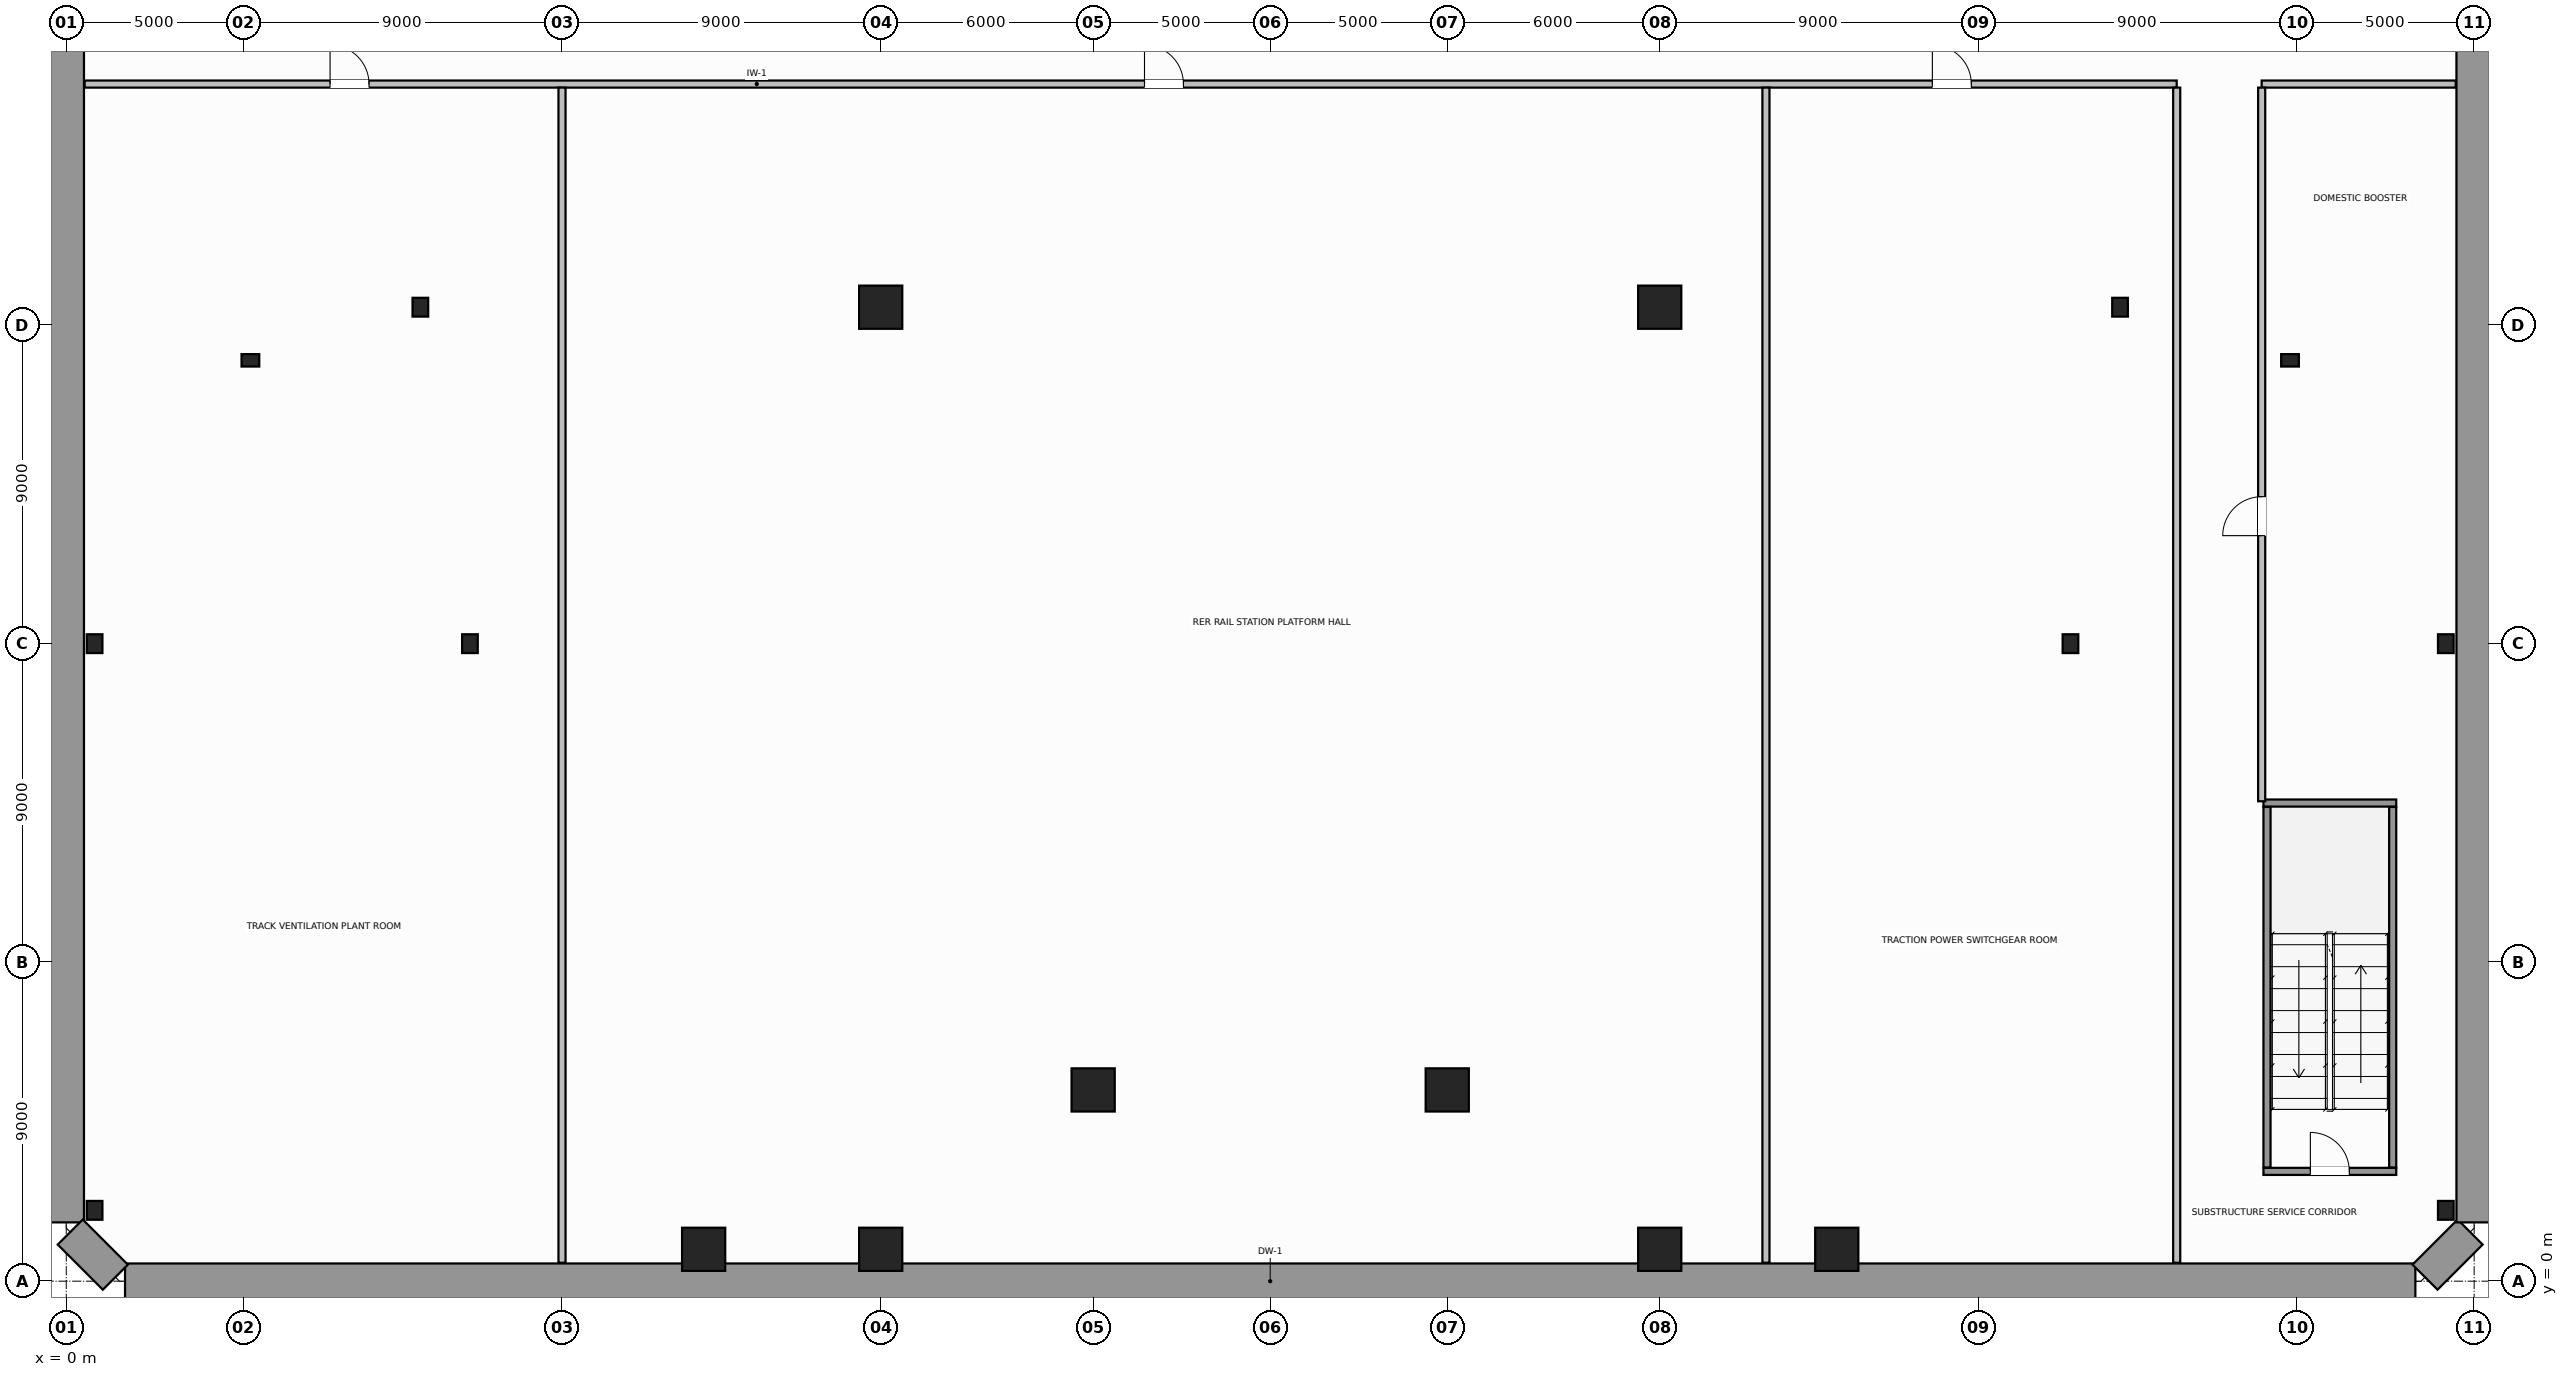
"""IFC4 building model, lengths in metres.
Left out: names, types, materials, properties, quantities, classifications, styles, units other than length and angle.
Written with IfcOpenShell. Run it as: python <this file> out.ifc"""

import sys

from ifc_helpers import new_model, si_unit, direction, frame, frame_2d, origin, origin_2d, place, context, subcontext, project, spatial, rectangle, hollow_circle, i_section, extrude, source, transform, mapped, element, fill, save


model = new_model("IFC4")
c1 = context("Model", 3, precision=1e-05, world=origin(), true_north=direction((0.0, 1.0)))
c2 = subcontext(c1, "Body", "Model", "MODEL_VIEW")
j1 = project(units=[si_unit("LENGTHUNIT", "METRE"), si_unit("PLANEANGLEUNIT", "RADIAN")], contexts=[c1])
p1 = place(None, origin())
s1 = spatial("IfcSite", under=j1, at=p1, CompositionType="ELEMENT")
p2 = place(p1, origin())
s2 = spatial("IfcBuilding", under=s1, at=p2, CompositionType="ELEMENT")
p3 = place(p2, frame((0.0, 0.0, -10.4)))
s3 = spatial("IfcBuildingStorey", under=s2, at=p3, CompositionType="ELEMENT", Elevation=-10.4)
m1 = source(origin(), c2, "Body", "SweptSolid", [
    extrude(hollow_circle(Radius=0.61, WallThickness=0.05, at=origin_2d()), origin(), (0.0, 0.0, 1.0), 5.2),
])
for number, where, z_axis, x_axis in (
    (1, (18.0, 0.9, 0.0), (0.0, 0.0, 1.0), (1.0, 0.0, 0.0)),
    (2, (23.0, 0.9, 0.0), (0.0, 0.0, 1.0), (1.0, 0.0, 0.0)),
    (3, (29.0, 5.4, 0.0), (0.0, 0.0, 1.0), (1.0, 0.0, 0.0)),
    (4, (39.0, 5.4, 0.0), (0.0, 0.0, 1.0), (1.0, 0.0, 0.0)),
    (5, (45.0, 0.9, 0.0), (0.0, 0.0, 1.0), (1.0, 0.0, 0.0)),
    (6, (50.0, 0.9, 0.0), (0.0, 0.0, 1.0), (1.0, 0.0, 0.0)),
):
    element("IfcColumn", number, at=place(p3, frame(where, z_axis=z_axis, x_axis=x_axis)), inside=s3, PredefinedType="COLUMN", context=c2, shape_type="MappedRepresentation", body=[
        mapped(m1, transform((0.0, 0.0, 0.0), scale=1.0)),
    ])
m2 = source(origin(), c2, "Body", "SweptSolid", [
    extrude(i_section(OverallWidth=0.442, OverallDepth=0.531, WebThickness=0.065, FlangeThickness=0.076, FilletRadius=0.015, at=origin_2d()), origin(), (0.0, 0.0, 1.0), 5.2),
])
for number, where, z_axis, x_axis in (
    (7, (0.8, 2.0, 0.0), (0.0, 0.0, 1.0), (1.0, 0.0, 0.0)),
    (8, (0.8, 18.0, 0.0), (0.0, 0.0, 1.0), (1.0, 0.0, 0.0)),
    (9, (67.2, 2.0, 0.0), (0.0, 0.0, 1.0), (1.0, 0.0, 0.0)),
    (10, (67.2, 18.0, 0.0), (0.0, 0.0, 1.0), (1.0, 0.0, 0.0)),
    (11, (10.0, 27.5, 0.0), (0.0, 0.0, 1.0), (1.0, 0.0, 0.0)),
    (12, (11.4, 18.0, 0.0), (0.0, 0.0, 1.0), (1.0, 0.0, 0.0)),
    (13, (58.0, 27.5, 0.0), (0.0, 0.0, 1.0), (1.0, 0.0, 0.0)),
    (14, (56.6, 18.0, 0.0), (0.0, 0.0, 1.0), (1.0, 0.0, 0.0)),
):
    element("IfcColumn", number, at=place(p3, frame(where, z_axis=z_axis, x_axis=x_axis)), inside=s3, PredefinedType="COLUMN", context=c2, shape_type="MappedRepresentation", body=[
        mapped(m2, transform((0.0, 0.0, 0.0), scale=1.0)),
    ])
for number, where, z_axis, x_axis in (
    (15, (23.0, 27.5, 0.0), (0.0, 0.0, 1.0), (1.0, 0.0, 0.0)),
    (16, (45.0, 27.5, 0.0), (0.0, 0.0, 1.0), (1.0, 0.0, 0.0)),
):
    element("IfcColumn", number, at=place(p3, frame(where, z_axis=z_axis, x_axis=x_axis)), inside=s3, PredefinedType="COLUMN", context=c2, shape_type="MappedRepresentation", body=[
        mapped(m1, transform((0.0, 0.0, 0.0), scale=1.0)),
    ])
m3 = source(origin(), c2, "Body", "SweptSolid", [
    extrude(rectangle(XDim=0.5, YDim=0.35, at=origin_2d()), origin(), (0.0, 0.0, 1.0), 4.88),
])
for number, where, z_axis, x_axis in (
    (17, (5.2, 26.0, 0.0), (0.0, 0.0, 1.0), (1.0, 0.0, 0.0)),
    (18, (62.8, 26.0, 0.0), (0.0, 0.0, 1.0), (1.0, 0.0, 0.0)),
):
    element("IfcColumn", number, at=place(p3, frame(where, z_axis=z_axis, x_axis=x_axis)), inside=s3, PredefinedType="PILASTER", context=c2, shape_type="MappedRepresentation", body=[
        mapped(m3, transform((0.0, 0.0, 0.0), scale=1.0)),
    ])
p4 = place(p3, frame((1.66, 0.0, 0.0), z_axis=(0.0, 0.0, 1.0), x_axis=(1.0, 0.0, 0.0)))
e19 = element("IfcWall", 19, at=p4, inside=s3, PredefinedType="STANDARD", context=c2, shape_type="SweptSolid", body=[
    extrude(rectangle(XDim=64.68, YDim=1.0, at=frame_2d((32.34, 0.0))), origin(), (0.0, 0.0, 1.0), 5.2),
])
p5 = place(p3, frame((66.613, 0.113, 0.0), z_axis=(0.0, 0.0, 1.0), x_axis=(0.707106781187, 0.707106781187, 0.0)))
e20 = element("IfcWall", 20, at=p5, inside=s3, PredefinedType="STANDARD", context=c2, shape_type="SweptSolid", body=[
    extrude(rectangle(XDim=1.802, YDim=1.0, at=frame_2d((0.901, 0.0))), origin(), (0.0, 0.0, 1.0), 5.2),
])
for number, where, z_axis, x_axis in (
    (21, (68.0, 1.66, 0.0), (0.0, 0.0, 1.0), (0.0, 1.0, 0.0)),
    (22, (0.0, 50.34, 0.0), (0.0, 0.0, 1.0), (0.0, -1.0, 0.0)),
):
    element("IfcWall", number, at=place(p3, frame(where, z_axis=z_axis, x_axis=x_axis)), inside=s3, PredefinedType="STANDARD", context=c2, shape_type="SweptSolid", body=[
        extrude(rectangle(XDim=48.68, YDim=1.0, at=frame_2d((24.34, 0.0))), origin(), (0.0, 0.0, 1.0), 5.2),
    ])
p6 = place(p3, frame((0.113, 1.387, 0.0), z_axis=(0.0, 0.0, 1.0), x_axis=(0.707106781187, -0.707106781187, 0.0)))
e23 = element("IfcWall", 23, at=p6, inside=s3, PredefinedType="STANDARD", context=c2, shape_type="SweptSolid", body=[
    extrude(rectangle(XDim=1.802, YDim=1.0, at=frame_2d((0.901, 0.0))), origin(), (0.0, 0.0, 1.0), 5.2),
])
p7 = place(p3, frame((62.05, 3.1, 0.0), z_axis=(0.0, 0.0, 1.0), x_axis=(1.0, 0.0, 0.0)))
e24 = element("IfcWall", 24, at=p7, inside=s3, PredefinedType="SOLIDWALL", context=c2, shape_type="SweptSolid", body=[
    extrude(rectangle(XDim=3.75, YDim=0.2, at=frame_2d((1.875, 0.0))), origin(), (0.0, 0.0, 1.0), 5.2),
])
p8 = place(p7, frame((1.325, 0.0, 0.0)))
e25 = element("IfcOpeningElement", 25, at=p8, cuts=e24, PredefinedType="OPENING", context=c2, shape_type="SweptSolid", body=[
    extrude(rectangle(XDim=1.1, YDim=2.15, at=frame_2d((0.55, 1.075))), frame((0.0, 0.11, 0.0), z_axis=(0.0, -1.0, 0.0), x_axis=(1.0, 0.0, 0.0)), (0.0, 0.0, 1.0), 0.22),
])
p9 = place(p3, frame((62.05, 13.5, 0.0), z_axis=(0.0, 0.0, 1.0), x_axis=(1.0, 0.0, 0.0)))
e26 = element("IfcWall", 26, at=p9, inside=s3, PredefinedType="SOLIDWALL", context=c2, shape_type="SweptSolid", body=[
    extrude(rectangle(XDim=3.75, YDim=0.2, at=frame_2d((1.875, 0.0))), origin(), (0.0, 0.0, 1.0), 5.2),
])
for number, where, z_axis, x_axis in (
    (27, (62.15, 3.21, 0.0), (0.0, 0.0, 1.0), (0.0, 1.0, 0.0)),
    (28, (65.7, 3.21, 0.0), (0.0, 0.0, 1.0), (0.0, 1.0, 0.0)),
):
    element("IfcWall", number, at=place(p3, frame(where, z_axis=z_axis, x_axis=x_axis)), inside=s3, PredefinedType="SOLIDWALL", context=c2, shape_type="SweptSolid", body=[
        extrude(rectangle(XDim=10.18, YDim=0.2, at=frame_2d((5.09, 0.0))), origin(), (0.0, 0.0, 1.0), 5.2),
    ])
p10 = place(p3, frame((0.52, 33.8, 0.0), z_axis=(0.0, 0.0, 1.0), x_axis=(1.0, 0.0, 0.0)))
e29 = element("IfcWall", 29, at=p10, inside=s3, PredefinedType="SOLIDWALL", context=c2, shape_type="SweptSolid", body=[
    extrude(rectangle(XDim=59.08, YDim=0.2, at=frame_2d((29.54, 0.0))), origin(), (0.0, 0.0, 1.0), 4.88),
])
p11 = place(p10, frame((6.93, 0.0, 0.0)))
e30 = element("IfcOpeningElement", 30, at=p11, cuts=e29, PredefinedType="OPENING", context=c2, shape_type="SweptSolid", body=[
    extrude(rectangle(XDim=1.1, YDim=2.15, at=frame_2d((0.55, 1.075))), frame((0.0, 0.11, 0.0), z_axis=(0.0, -1.0, 0.0), x_axis=(1.0, 0.0, 0.0)), (0.0, 0.0, 1.0), 0.22),
])
p12 = place(p10, frame((29.93, 0.0, 0.0)))
e31 = element("IfcOpeningElement", 31, at=p12, cuts=e29, PredefinedType="OPENING", context=c2, shape_type="SweptSolid", body=[
    extrude(rectangle(XDim=1.1, YDim=2.15, at=frame_2d((0.55, 1.075))), frame((0.0, 0.11, 0.0), z_axis=(0.0, -1.0, 0.0), x_axis=(1.0, 0.0, 0.0)), (0.0, 0.0, 1.0), 0.22),
])
p13 = place(p10, frame((52.18, 0.0, 0.0)))
e32 = element("IfcOpeningElement", 32, at=p13, cuts=e29, PredefinedType="OPENING", context=c2, shape_type="SweptSolid", body=[
    extrude(rectangle(XDim=1.1, YDim=2.15, at=frame_2d((0.55, 1.075))), frame((0.0, 0.11, 0.0), z_axis=(0.0, -1.0, 0.0), x_axis=(1.0, 0.0, 0.0)), (0.0, 0.0, 1.0), 0.22),
])
p14 = place(p3, frame((62.0, 33.8, 0.0), z_axis=(0.0, 0.0, 1.0), x_axis=(1.0, 0.0, 0.0)))
e33 = element("IfcWall", 33, at=p14, inside=s3, PredefinedType="SOLIDWALL", context=c2, shape_type="SweptSolid", body=[
    extrude(rectangle(XDim=5.48, YDim=0.2, at=frame_2d((2.74, 0.0))), origin(), (0.0, 0.0, 1.0), 4.88),
])
p15 = place(p3, frame((59.6, 0.52, 0.0), z_axis=(0.0, 0.0, 1.0), x_axis=(0.0, 1.0, 0.0)))
e34 = element("IfcWall", 34, at=p15, inside=s3, PredefinedType="SOLIDWALL", context=c2, shape_type="SweptSolid", body=[
    extrude(rectangle(XDim=33.18, YDim=0.2, at=frame_2d((16.59, 0.0))), origin(), (0.0, 0.0, 1.0), 3.96),
])
p16 = place(p3, frame((62.0, 13.55, 0.0), z_axis=(0.0, 0.0, 1.0), x_axis=(0.0, 1.0, 0.0)))
e35 = element("IfcWall", 35, at=p16, inside=s3, PredefinedType="SOLIDWALL", context=c2, shape_type="SweptSolid", body=[
    extrude(rectangle(XDim=20.15, YDim=0.2, at=frame_2d((10.075, 0.0))), origin(), (0.0, 0.0, 1.0), 4.88),
])
p17 = place(p16, frame((7.5, 0.0, 0.0)))
e36 = element("IfcOpeningElement", 36, at=p17, cuts=e35, PredefinedType="OPENING", context=c2, shape_type="SweptSolid", body=[
    extrude(rectangle(XDim=1.1, YDim=2.15, at=frame_2d((0.55, 1.075))), frame((0.0, 0.11, 0.0), z_axis=(0.0, -1.0, 0.0), x_axis=(1.0, 0.0, 0.0)), (0.0, 0.0, 1.0), 0.22),
])
p18 = place(p3, frame((14.0, 0.52, 0.0), z_axis=(0.0, 0.0, 1.0), x_axis=(0.0, 1.0, 0.0)))
e37 = element("IfcWall", 37, at=p18, inside=s3, PredefinedType="SOLIDWALL", context=c2, shape_type="SweptSolid", body=[
    extrude(rectangle(XDim=33.18, YDim=0.2, at=frame_2d((16.59, 0.0))), origin(), (0.0, 0.0, 1.0), 3.96),
])
p19 = place(p3, frame((48.0, 0.52, 0.0), z_axis=(0.0, 0.0, 1.0), x_axis=(0.0, 1.0, 0.0)))
e38 = element("IfcWall", 38, at=p19, inside=s3, PredefinedType="SOLIDWALL", context=c2, shape_type="SweptSolid", body=[
    extrude(rectangle(XDim=33.18, YDim=0.2, at=frame_2d((16.59, 0.0))), origin(), (0.0, 0.0, 1.0), 4.88),
])
m4 = source(origin(), c2, "Body", "SweptSolid", [
    extrude(rectangle(XDim=1.1, YDim=2.15, at=frame_2d((0.55, 1.075))), frame((0.0, 0.025, 0.0), z_axis=(0.0, -1.0, 0.0), x_axis=(1.0, 0.0, 0.0)), (0.0, 0.0, 1.0), 0.05),
])
p20 = place(p8, origin())
e39 = element("IfcDoor", 39, at=p20, inside=s3, OperationType="SINGLE_SWING_RIGHT", PredefinedType="DOOR", context=c2, shape_type="MappedRepresentation", body=[
    mapped(m4, transform((0.0, 0.0, 0.0), scale=1.0)),
])
fill(e25, e39)
p21 = place(p11, origin())
e40 = element("IfcDoor", 40, at=p21, inside=s3, OperationType="SINGLE_SWING_LEFT", PredefinedType="DOOR", context=c2, shape_type="MappedRepresentation", body=[
    mapped(m4, transform((0.0, 0.0, 0.0), scale=1.0)),
])
fill(e30, e40)
p22 = place(p12, origin())
e41 = element("IfcDoor", 41, at=p22, inside=s3, OperationType="SINGLE_SWING_RIGHT", PredefinedType="DOOR", context=c2, shape_type="MappedRepresentation", body=[
    mapped(m4, transform((0.0, 0.0, 0.0), scale=1.0)),
])
fill(e31, e41)
p23 = place(p13, origin())
e42 = element("IfcDoor", 42, at=p23, inside=s3, OperationType="SINGLE_SWING_LEFT", PredefinedType="DOOR", context=c2, shape_type="MappedRepresentation", body=[
    mapped(m4, transform((0.0, 0.0, 0.0), scale=1.0)),
])
fill(e32, e42)
p24 = place(p17, origin())
e43 = element("IfcDoor", 43, at=p24, inside=s3, OperationType="SINGLE_SWING_RIGHT", PredefinedType="DOOR", context=c2, shape_type="MappedRepresentation", body=[
    mapped(m4, transform((0.0, 0.0, 0.0), scale=1.0)),
])
fill(e36, e43)
save(model, sys.argv[1])
